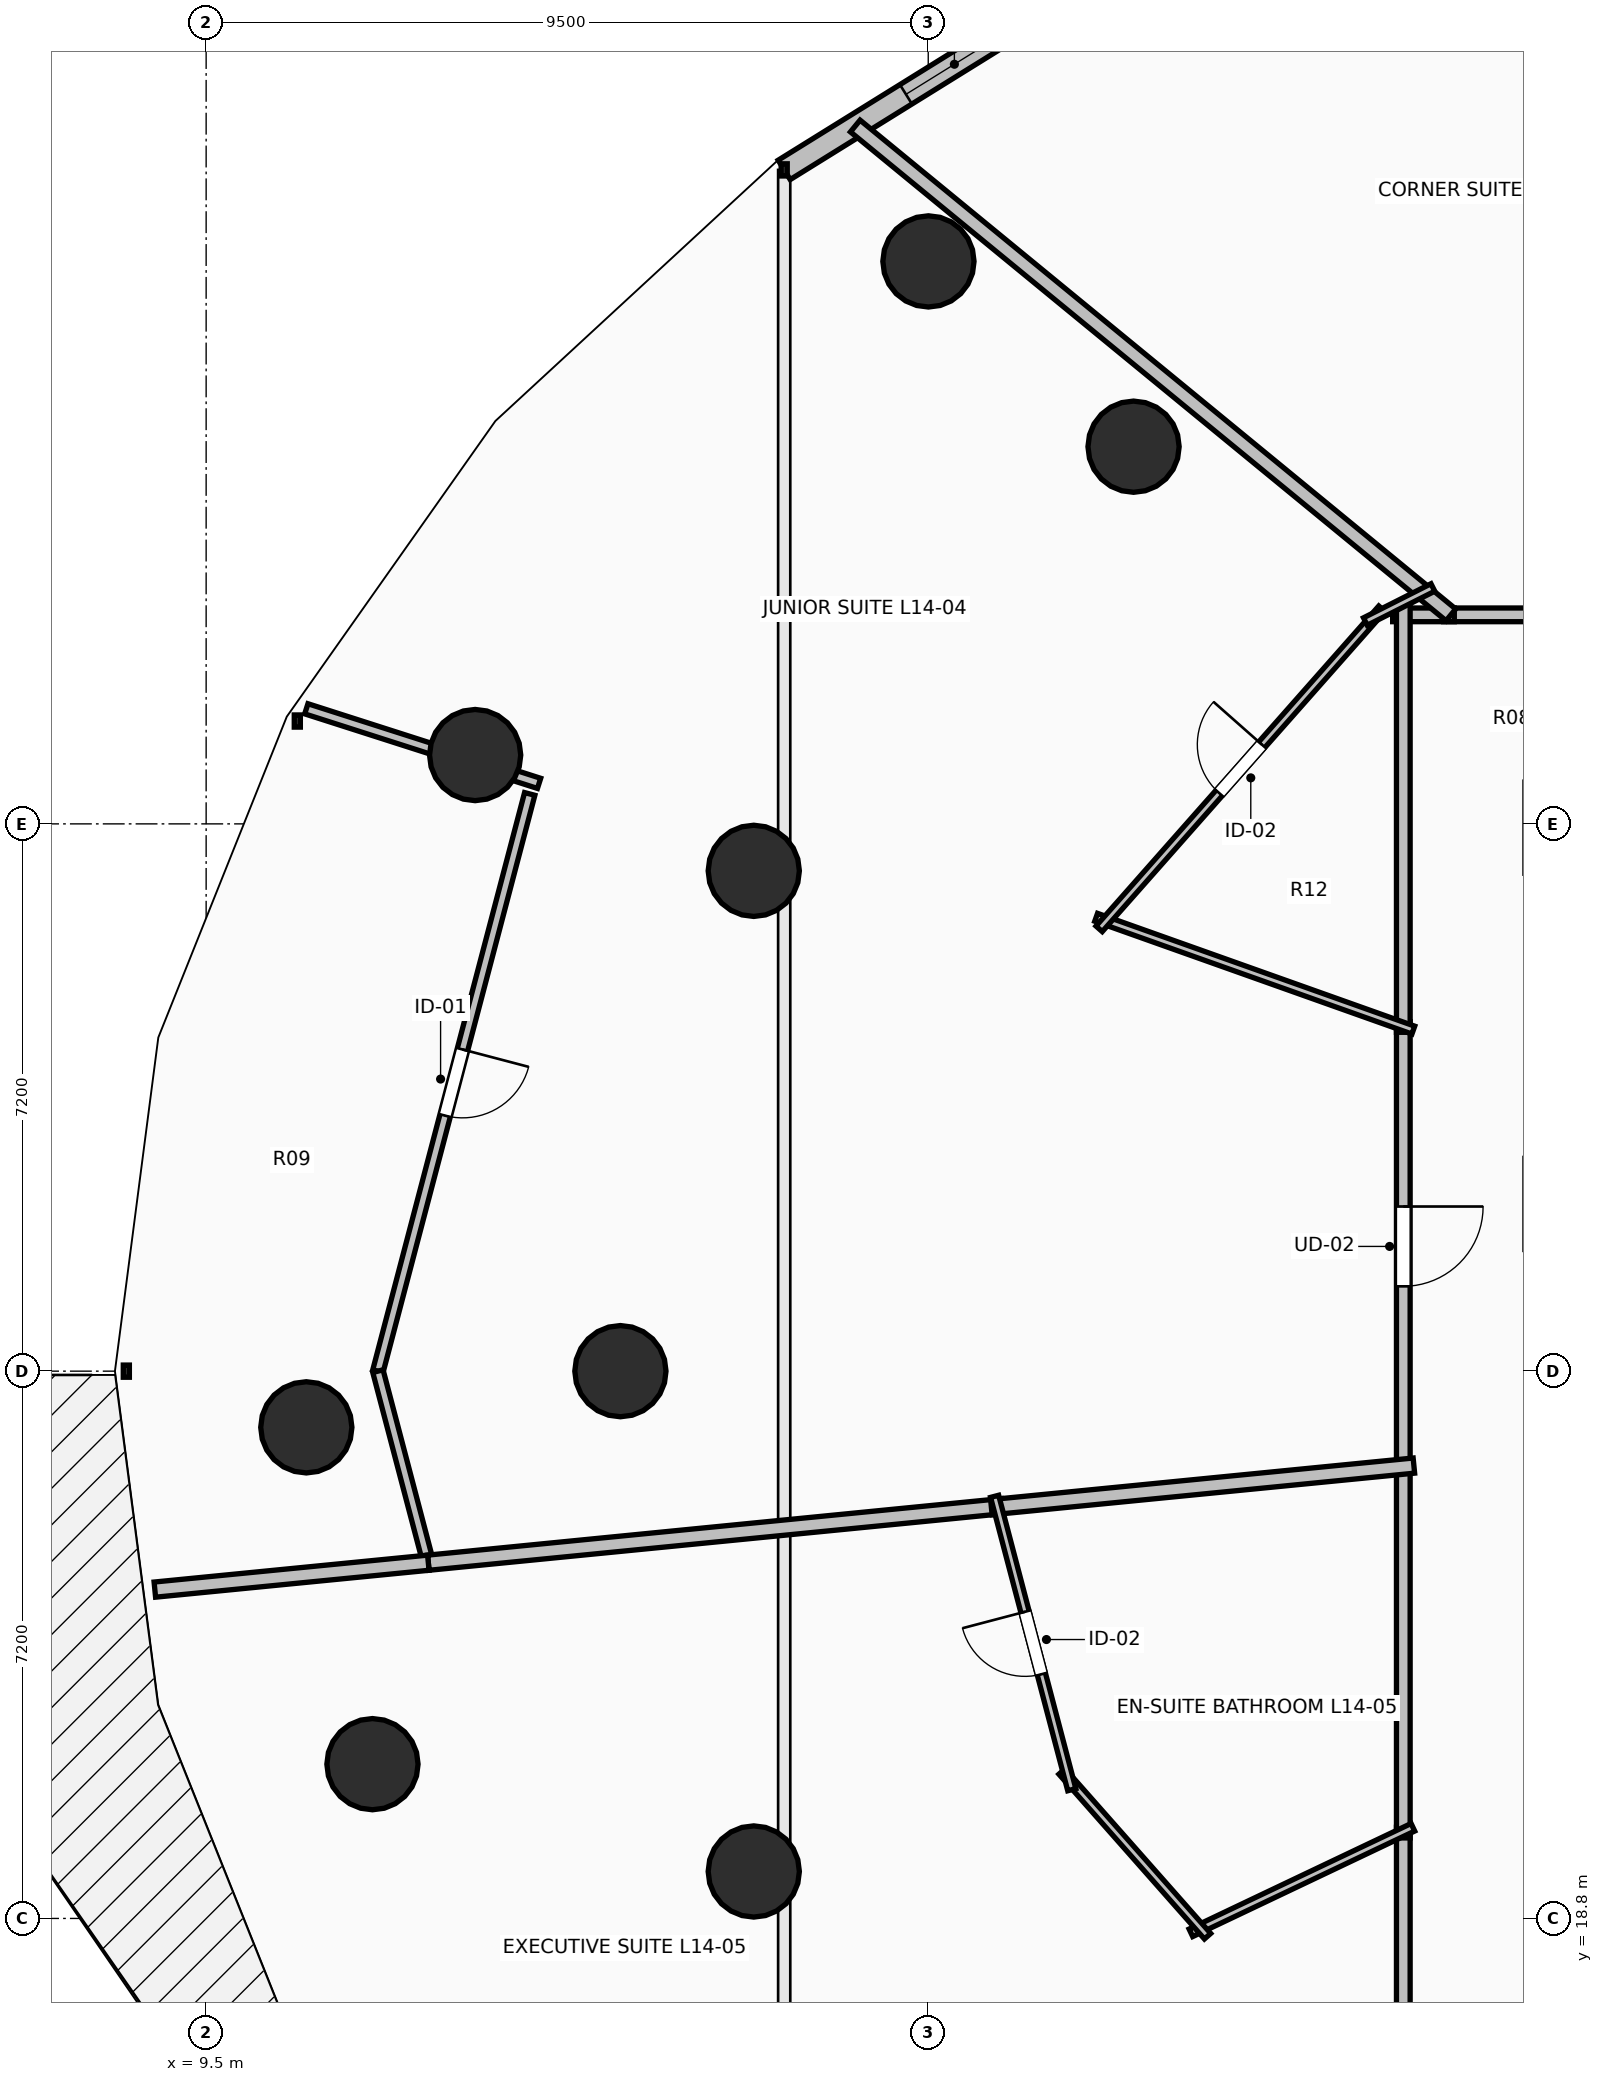
"""IFC4 building model, lengths in metres.
Left out: names, types, materials, properties, quantities, classifications, styles, units other than length and angle.
Written with IfcOpenShell. Run it as: python <this file> out.ifc"""

import sys

from ifc_helpers import new_model, si_unit, direction, frame, frame_2d, origin, origin_2d, place, context, subcontext, project, spatial, rectangle, circle, extrude, element, fill, save


model = new_model("IFC4")
c1 = context("Model", 3, precision=1e-05, world=origin(), true_north=direction((0.0, 1.0)))
c2 = subcontext(c1, "Body", "Model", "MODEL_VIEW")
j1 = project(units=[si_unit("LENGTHUNIT", "METRE"), si_unit("PLANEANGLEUNIT", "RADIAN")], contexts=[c1])
p1 = place(None, origin())
s1 = spatial("IfcSite", under=j1, at=p1, CompositionType="ELEMENT")
p2 = place(p1, origin())
s2 = spatial("IfcBuilding", under=s1, at=p2, CompositionType="ELEMENT")
p3 = place(p2, frame((0.0, 0.0, 55.5)))
s3 = spatial("IfcBuildingStorey", under=s2, at=p3, CompositionType="ELEMENT", Elevation=55.5)
for number, where, z_axis, x_axis in (
    (1, (21.701, 38.162, 0.0), (0.0, 0.0, 1.0), (-0.707, 0.707, 0.0)),
    (2, (16.705, 32.582, 0.0), (0.0, 0.0, 1.0), (-0.924, 0.383, 0.0)),
    (3, (14.95, 26.0, 0.0), (0.0, 0.0, 1.0), (-1.0, 0.0, 0.0)),
    (4, (16.705, 19.418, 0.0), (0.0, 0.0, 1.0), (-0.924, -0.383, 0.0)),
    (5, (19.003, 40.6, 0.0), (0.0, 0.0, 1.0), (-0.707, 0.707, 0.0)),
    (6, (13.039, 34.105, 0.0), (0.0, 0.0, 1.0), (-0.924, 0.383, 0.0)),
    (7, (10.818, 25.261, 0.0), (0.0, 0.0, 1.0), (-1.0, 0.0, 0.0)),
    (8, (11.688, 20.83, 0.0), (0.0, 0.0, 1.0), (-0.924, -0.383, 0.0)),
):
    element("IfcColumn", number, at=place(p3, frame(where, z_axis=z_axis, x_axis=x_axis)), inside=s3, PredefinedType="COLUMN", context=c2, shape_type="SweptSolid", body=[
        extrude(circle(Radius=0.6, at=origin_2d()), origin(), (0.0, 0.0, 1.0), 3.5),
    ])
p4 = place(p3, frame((21.583, 44.583, 0.0), z_axis=(0.0, 0.0, 1.0), x_axis=(-0.849633724826, -0.527373239404, 0.0)))
e9 = element("IfcWall", 9, at=p4, inside=s3, PredefinedType="STANDARD", context=c2, shape_type="SweptSolid", body=[
    extrude(rectangle(XDim=5.271, YDim=0.3, at=frame_2d((2.635, 0.0))), origin(), (0.0, 0.0, 1.0), 3.24),
])
p5 = place(p4, frame((1.885, 0.0, 0.85)))
e10 = element("IfcOpeningElement", 10, at=p5, cuts=e9, PredefinedType="OPENING", context=c2, shape_type="SweptSolid", body=[
    extrude(rectangle(XDim=1.5, YDim=2.19, at=frame_2d((0.75, 1.095))), frame((0.0, 0.165, 0.0), z_axis=(0.0, -1.0, 0.0), x_axis=(1.0, 0.0, 0.0)), (0.0, 0.0, 1.0), 0.33),
])
p6 = place(p3, frame((33.33, 35.95, 0.0), z_axis=(0.0, 0.0, 1.0), x_axis=(-1.0, 0.0, 0.0)))
e11 = element("IfcWall", 11, at=p6, inside=s3, PredefinedType="PARTITIONING", context=c2, shape_type="SweptSolid", body=[
    extrude(rectangle(XDim=7.549, YDim=0.18, at=frame_2d((3.774, 0.0))), origin(), (0.0, 0.0, 1.0), 2.432),
])
p7 = place(p6, frame((3.25, 0.0, 0.0)))
e12 = element("IfcOpeningElement", 12, at=p7, cuts=e11, PredefinedType="OPENING", context=c2, shape_type="SweptSolid", body=[
    extrude(rectangle(XDim=1.05, YDim=2.2, at=frame_2d((0.525, 1.1))), frame((0.0, 0.105, 0.0), z_axis=(0.0, -1.0, 0.0), x_axis=(1.0, 0.0, 0.0)), (0.0, 0.0, 1.0), 0.21),
])
p8 = place(p3, frame((25.25, 30.598, 0.0), z_axis=(0.0, 0.0, 1.0), x_axis=(0.0, -1.0, 0.0)))
e13 = element("IfcWall", 13, at=p8, inside=s3, PredefinedType="PARTITIONING", context=c2, shape_type="SweptSolid", body=[
    extrude(rectangle(XDim=5.914, YDim=0.18, at=frame_2d((2.957, 0.0))), origin(), (0.0, 0.0, 1.0), 2.432),
])
p9 = place(p8, frame((2.432, 0.0, 0.0)))
e14 = element("IfcOpeningElement", 14, at=p9, cuts=e13, PredefinedType="OPENING", context=c2, shape_type="SweptSolid", body=[
    extrude(rectangle(XDim=1.05, YDim=2.2, at=frame_2d((0.525, 1.1))), frame((0.0, 0.105, 0.0), z_axis=(0.0, -1.0, 0.0), x_axis=(1.0, 0.0, 0.0)), (0.0, 0.0, 1.0), 0.21),
])
p10 = place(p3, frame((25.921, 35.95, 0.0), z_axis=(0.0, 0.0, 1.0), x_axis=(-1.0, 0.0, 0.0)))
e15 = element("IfcWall", 15, at=p10, inside=s3, PredefinedType="PARTITIONING", context=c2, shape_type="SweptSolid", body=[
    extrude(rectangle(XDim=0.811, YDim=0.18, at=frame_2d((0.405, 0.0))), origin(), (0.0, 0.0, 1.0), 2.929),
])
p11 = place(p3, frame((25.25, 36.09, 0.0), z_axis=(0.0, 0.0, 1.0), x_axis=(0.0, -1.0, 0.0)))
e16 = element("IfcWall", 16, at=p11, inside=s3, PredefinedType="PARTITIONING", context=c2, shape_type="SweptSolid", body=[
    extrude(rectangle(XDim=5.632, YDim=0.18, at=frame_2d((2.816, 0.0))), origin(), (0.0, 0.0, 1.0), 2.432),
])
p12 = place(p3, frame((25.25, 19.999, 0.0), z_axis=(0.0, 0.0, 1.0), x_axis=(0.0, -1.0, 0.0)))
e17 = element("IfcWall", 17, at=p12, inside=s3, PredefinedType="PARTITIONING", context=c2, shape_type="SweptSolid", body=[
    extrude(rectangle(XDim=5.899, YDim=0.18, at=frame_2d((2.949, 0.0))), origin(), (0.0, 0.0, 1.0), 2.432),
])
p13 = place(p12, frame((2.425, 0.0, 0.0)))
e18 = element("IfcOpeningElement", 18, at=p13, cuts=e17, PredefinedType="OPENING", context=c2, shape_type="SweptSolid", body=[
    extrude(rectangle(XDim=1.05, YDim=2.2, at=frame_2d((0.525, 1.1))), frame((0.0, 0.105, 0.0), z_axis=(0.0, -1.0, 0.0), x_axis=(1.0, 0.0, 0.0)), (0.0, 0.0, 1.0), 0.21),
])
p14 = place(p3, frame((25.25, 24.824, 0.0), z_axis=(0.0, 0.0, 1.0), x_axis=(0.0, -1.0, 0.0)))
e19 = element("IfcWall", 19, at=p14, inside=s3, PredefinedType="PARTITIONING", context=c2, shape_type="SweptSolid", body=[
    extrude(rectangle(XDim=4.965, YDim=0.18, at=frame_2d((2.482, 0.0))), origin(), (0.0, 0.0, 1.0), 3.24),
])
p15 = place(p3, frame((18.04, 42.381, 0.0), z_axis=(0.0, 0.0, 1.0), x_axis=(0.772992813725, -0.634414777515, 0.0)))
e20 = element("IfcWall", 20, at=p15, inside=s3, PredefinedType="PARTITIONING", context=c2, shape_type="SweptSolid", body=[
    extrude(rectangle(XDim=10.137, YDim=0.2, at=frame_2d((5.069, 0.0))), origin(), (0.0, 0.0, 1.0), 2.624),
])
p16 = place(p3, frame((25.382, 30.487, 0.0), z_axis=(0.0, 0.0, 1.0), x_axis=(-0.942199995763, 0.335050993111, 0.0)))
e21 = element("IfcWall", 21, at=p16, inside=s3, PredefinedType="PARTITIONING", context=c2, shape_type="SweptSolid", body=[
    extrude(rectangle(XDim=4.429, YDim=0.11, at=frame_2d((2.214, 0.0))), origin(), (0.0, 0.0, 1.0), 2.929),
])
p17 = place(p3, frame((21.248, 31.819, 0.0), z_axis=(0.0, 0.0, 1.0), x_axis=(0.662135950736, 0.749383735307, 0.0)))
e22 = element("IfcWall", 22, at=p17, inside=s3, PredefinedType="PARTITIONING", context=c2, shape_type="SweptSolid", body=[
    extrude(rectangle(XDim=5.619, YDim=0.11, at=frame_2d((2.81, 0.0))), origin(), (0.0, 0.0, 1.0), 2.432),
])
p18 = place(p17, frame((2.385, 0.0, 0.0)))
e23 = element("IfcOpeningElement", 23, at=p18, cuts=e22, PredefinedType="OPENING", context=c2, shape_type="SweptSolid", body=[
    extrude(rectangle(XDim=0.85, YDim=2.1, at=frame_2d((0.425, 1.05))), frame((0.0, 0.07, 0.0), z_axis=(0.0, -1.0, 0.0), x_axis=(1.0, 0.0, 0.0)), (0.0, 0.0, 1.0), 0.14),
])
p19 = place(p3, frame((24.751, 35.862, 0.0), z_axis=(0.0, 0.0, 1.0), x_axis=(0.892702438486, 0.450646598037, 0.0)))
e24 = element("IfcWall", 24, at=p19, inside=s3, PredefinedType="PARTITIONING", context=c2, shape_type="SweptSolid", body=[
    extrude(rectangle(XDim=0.995, YDim=0.11, at=frame_2d((0.497, 0.0))), origin(), (0.0, 0.0, 1.0), 3.24),
])
p20 = place(p3, frame((13.757, 33.594, 0.0), z_axis=(0.0, 0.0, 1.0), x_axis=(-0.254332600041, -0.96711681226, 0.0)))
e25 = element("IfcWall", 25, at=p20, inside=s3, PredefinedType="PARTITIONING", context=c2, shape_type="SweptSolid", body=[
    extrude(rectangle(XDim=7.852, YDim=0.14, at=frame_2d((3.926, 0.0))), origin(), (0.0, 0.0, 1.0), 2.432),
])
p21 = place(p20, frame((3.476, 0.0, 0.0)))
e26 = element("IfcOpeningElement", 26, at=p21, cuts=e25, PredefinedType="OPENING", context=c2, shape_type="SweptSolid", body=[
    extrude(rectangle(XDim=0.9, YDim=2.1, at=frame_2d((0.45, 1.05))), frame((0.0, 0.085, 0.0), z_axis=(0.0, -1.0, 0.0), x_axis=(1.0, 0.0, 0.0)), (0.0, 0.0, 1.0), 0.17),
])
p22 = place(p3, frame((11.76, 26.0, 0.0), z_axis=(0.0, 0.0, 1.0), x_axis=(0.254465628682, -0.967081818576, 0.0)))
e27 = element("IfcWall", 27, at=p22, inside=s3, PredefinedType="PARTITIONING", context=c2, shape_type="SweptSolid", body=[
    extrude(rectangle(XDim=2.606, YDim=0.14, at=frame_2d((1.303, 0.0))), origin(), (0.0, 0.0, 1.0), 2.432),
])
p23 = place(p3, frame((10.818, 34.714, 0.0), z_axis=(0.0, 0.0, 1.0), x_axis=(0.952294454461, -0.305180720236, 0.0)))
e28 = element("IfcWall", 28, at=p23, inside=s3, PredefinedType="PARTITIONING", context=c2, shape_type="SweptSolid", body=[
    extrude(rectangle(XDim=3.215, YDim=0.14, at=frame_2d((1.607, 0.0))), origin(), (0.0, 0.0, 1.0), 2.432),
])
p24 = place(p3, frame((12.423, 23.48, 0.0), z_axis=(0.0, 0.0, 1.0), x_axis=(0.995173937517, 0.098126622721, 0.0)))
e29 = element("IfcWall", 29, at=p24, inside=s3, PredefinedType="PARTITIONING", context=c2, shape_type="SweptSolid", body=[
    extrude(rectangle(XDim=7.583, YDim=0.2, at=frame_2d((3.792, 0.0))), origin(), (0.0, 0.0, 1.0), 2.886),
])
p25 = place(p3, frame((19.831, 24.21, 0.0), z_axis=(0.0, 0.0, 1.0), x_axis=(0.995182391057, 0.098040851333, 0.0)))
e30 = element("IfcWall", 30, at=p25, inside=s3, PredefinedType="PARTITIONING", context=c2, shape_type="SweptSolid", body=[
    extrude(rectangle(XDim=5.585, YDim=0.2, at=frame_2d((2.793, 0.0))), origin(), (0.0, 0.0, 1.0), 2.929),
])
p26 = place(p3, frame((8.825, 23.126, 0.0), z_axis=(0.0, 0.0, 1.0), x_axis=(0.995195038103, 0.097912390097, 0.0)))
e31 = element("IfcWall", 31, at=p26, inside=s3, PredefinedType="PARTITIONING", context=c2, shape_type="SweptSolid", body=[
    extrude(rectangle(XDim=3.615, YDim=0.2, at=frame_2d((1.808, 0.0))), origin(), (0.0, 0.0, 1.0), 2.624),
])
p27 = place(p3, frame((25.376, 19.999, 0.0), z_axis=(0.0, 0.0, 1.0), x_axis=(-0.903186785932, -0.429247748647, 0.0)))
e32 = element("IfcWall", 32, at=p27, inside=s3, PredefinedType="PARTITIONING", context=c2, shape_type="SweptSolid", body=[
    extrude(rectangle(XDim=3.234, YDim=0.11, at=frame_2d((1.617, 0.0))), origin(), (0.0, 0.0, 1.0), 2.929),
])
p28 = place(p3, frame((22.675, 18.566, 0.0), z_axis=(0.0, 0.0, 1.0), x_axis=(-0.661981720099, 0.749519981224, 0.0)))
e33 = element("IfcWall", 33, at=p28, inside=s3, PredefinedType="PARTITIONING", context=c2, shape_type="SweptSolid", body=[
    extrude(rectangle(XDim=2.892, YDim=0.11, at=frame_2d((1.446, 0.0))), origin(), (0.0, 0.0, 1.0), 2.929),
])
p29 = place(p3, frame((20.889, 20.494, 0.0), z_axis=(0.0, 0.0, 1.0), x_axis=(-0.254405980461, 0.967097511684, 0.0)))
e34 = element("IfcWall", 34, at=p29, inside=s3, PredefinedType="PARTITIONING", context=c2, shape_type="SweptSolid", body=[
    extrude(rectangle(XDim=3.991, YDim=0.11, at=frame_2d((1.996, 0.0))), origin(), (0.0, 0.0, 1.0), 3.24),
])
p30 = place(p29, frame((1.571, 0.0, 0.0)))
e35 = element("IfcOpeningElement", 35, at=p30, cuts=e34, PredefinedType="OPENING", context=c2, shape_type="SweptSolid", body=[
    extrude(rectangle(XDim=0.85, YDim=2.1, at=frame_2d((0.425, 1.05))), frame((0.0, 0.07, 0.0), z_axis=(0.0, -1.0, 0.0), x_axis=(1.0, 0.0, 0.0)), (0.0, 0.0, 1.0), 0.14),
])
p31 = place(p5, origin())
e36 = element("IfcWindow", 36, at=p31, inside=s3, PartitioningType="SINGLE_PANEL", PredefinedType="WINDOW", context=c2, shape_type="SweptSolid", body=[
    extrude(rectangle(XDim=1.5, YDim=2.19, at=frame_2d((0.75, 1.095))), frame((0.0, 0.03, 0.0), z_axis=(0.0, -1.0, 0.0), x_axis=(1.0, 0.0, 0.0)), (0.0, 0.0, 1.0), 0.06),
])
fill(e10, e36)
p32 = place(p9, origin())
e37 = element("IfcDoor", 37, at=p32, inside=s3, OperationType="SINGLE_SWING_LEFT", PredefinedType="DOOR", context=c2, shape_type="SweptSolid", body=[
    extrude(rectangle(XDim=1.05, YDim=2.2, at=frame_2d((0.525, 1.1))), frame((0.0, 0.025, 0.0), z_axis=(0.0, -1.0, 0.0), x_axis=(1.0, 0.0, 0.0)), (0.0, 0.0, 1.0), 0.05),
])
fill(e14, e37)
p33 = place(p18, origin())
e38 = element("IfcDoor", 38, at=p33, inside=s3, OperationType="SINGLE_SWING_RIGHT", PredefinedType="DOOR", context=c2, shape_type="SweptSolid", body=[
    extrude(rectangle(XDim=0.85, YDim=2.1, at=frame_2d((0.425, 1.05))), frame((0.0, 0.025, 0.0), z_axis=(0.0, -1.0, 0.0), x_axis=(1.0, 0.0, 0.0)), (0.0, 0.0, 1.0), 0.05),
])
fill(e23, e38)
p34 = place(p21, origin())
e39 = element("IfcDoor", 39, at=p34, inside=s3, OperationType="SINGLE_SWING_LEFT", PredefinedType="DOOR", context=c2, shape_type="SweptSolid", body=[
    extrude(rectangle(XDim=0.9, YDim=2.1, at=frame_2d((0.45, 1.05))), frame((0.0, 0.025, 0.0), z_axis=(0.0, -1.0, 0.0), x_axis=(1.0, 0.0, 0.0)), (0.0, 0.0, 1.0), 0.05),
])
fill(e26, e39)
p35 = place(p30, origin())
e40 = element("IfcDoor", 40, at=p35, inside=s3, OperationType="SINGLE_SWING_RIGHT", PredefinedType="DOOR", context=c2, shape_type="SweptSolid", body=[
    extrude(rectangle(XDim=0.85, YDim=2.1, at=frame_2d((0.425, 1.05))), frame((0.0, 0.025, 0.0), z_axis=(0.0, -1.0, 0.0), x_axis=(1.0, 0.0, 0.0)), (0.0, 0.0, 1.0), 0.05),
])
fill(e35, e40)
save(model, sys.argv[1])
